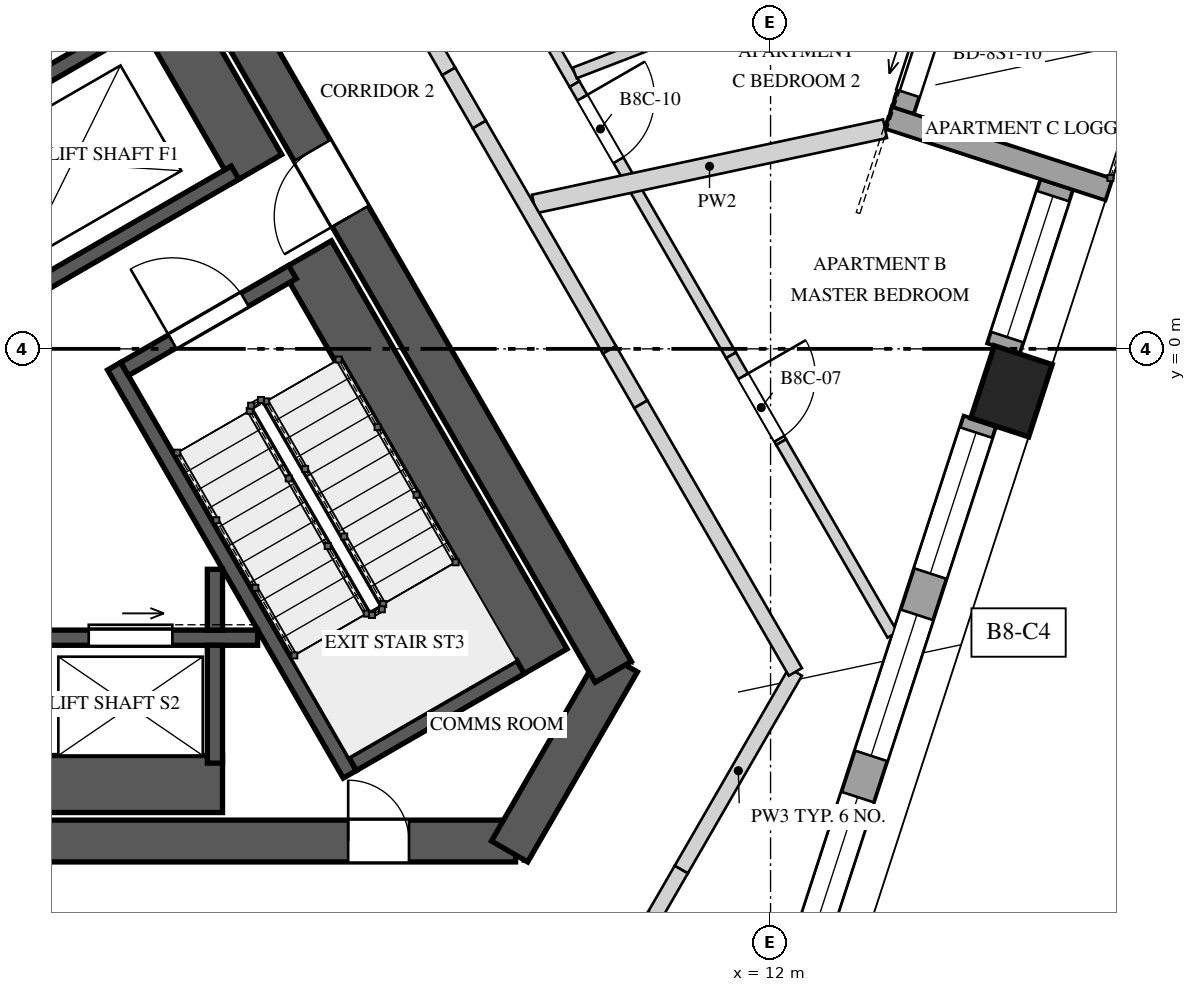
"""IFC4 building model, lengths in metres.
Left out: names, types, materials, properties, quantities, classifications, styles, units other than length and angle.
Written with IfcOpenShell. Run it as: python <this file> out.ifc"""

import sys

from ifc_helpers import new_model, si_unit, direction, frame, frame_2d, origin, origin_2d, place, context, subcontext, project, spatial, polyline, rectangle, outline, extrude, element, fill, save


model = new_model("IFC4")
c1 = context("Model", 3, precision=1e-05, world=origin(), true_north=direction((0.0, 1.0)))
c2 = subcontext(c1, "Body", "Model", "MODEL_VIEW")
j1 = project(units=[si_unit("LENGTHUNIT", "METRE"), si_unit("PLANEANGLEUNIT", "RADIAN")], contexts=[c1])
p1 = place(None, origin())
s1 = spatial("IfcSite", under=j1, at=p1, CompositionType="ELEMENT")
p2 = place(p1, origin())
s2 = spatial("IfcBuilding", under=s1, at=p2, CompositionType="ELEMENT")
p3 = place(p2, frame((0.0, 0.0, 344.4)))
s3 = spatial("IfcBuildingStorey", under=s2, at=p3, CompositionType="ELEMENT", Elevation=344.4)
p4 = place(p3, frame((-8.646, -6.475, 0.0), z_axis=(0.0, 0.0, 1.0), x_axis=(1.0, 0.0, 0.0)))
e1 = element("IfcWall", 1, at=p4, inside=s3, PredefinedType="SHEAR", context=c2, shape_type="SweptSolid", body=[
    extrude(rectangle(XDim=17.292, YDim=0.55, at=frame_2d((8.646, 0.0))), origin(), (0.0, 0.0, 1.0), 4.0),
])
p5 = place(p4, frame((6.851, 0.0, 0.0)))
e2 = element("IfcOpeningElement", 2, at=p5, cuts=e1, PredefinedType="OPENING", context=c2, shape_type="SweptSolid", body=[
    extrude(rectangle(XDim=1.0, YDim=2.4, at=frame_2d((0.5, 1.2))), frame((0.0, 0.285, 0.0), z_axis=(0.0, -1.0, 0.0), x_axis=(1.0, 0.0, 0.0)), (0.0, 0.0, 1.0), 0.57),
])
p6 = place(p4, frame((15.089, 0.0, 0.0)))
e3 = element("IfcOpeningElement", 3, at=p6, cuts=e1, PredefinedType="OPENING", context=c2, shape_type="SweptSolid", body=[
    extrude(rectangle(XDim=0.8, YDim=2.1, at=frame_2d((0.4, 1.05))), frame((0.0, 0.285, 0.0), z_axis=(0.0, -1.0, 0.0), x_axis=(1.0, 0.0, 0.0)), (0.0, 0.0, 1.0), 0.57),
])
p7 = place(p3, frame((8.566, -6.613, 0.0), z_axis=(0.0, 0.0, 1.0), x_axis=(0.499995765644, 0.866027848477, 0.0)))
e4 = element("IfcWall", 4, at=p7, inside=s3, PredefinedType="SHEAR", context=c2, shape_type="SweptSolid", body=[
    extrude(rectangle(XDim=2.887, YDim=0.55, at=frame_2d((1.443, 0.0))), origin(), (0.0, 0.0, 1.0), 4.0),
])
p8 = place(p3, frame((9.93, -4.25, 0.0), z_axis=(0.0, 0.0, 1.0), x_axis=(-0.499994590896, 0.86602852671, 0.0)))
e5 = element("IfcWall", 5, at=p8, inside=s3, PredefinedType="SHEAR", context=c2, shape_type="SweptSolid", body=[
    extrude(rectangle(XDim=17.292, YDim=0.55, at=frame_2d((8.646, 0.0))), origin(), (0.0, 0.0, 1.0), 4.0),
])
p9 = place(p8, frame((6.921, 0.0, 0.0)))
e6 = element("IfcOpeningElement", 6, at=p9, cuts=e5, PredefinedType="OPENING", context=c2, shape_type="SweptSolid", body=[
    extrude(rectangle(XDim=1.0, YDim=2.4, at=frame_2d((0.5, 1.2))), frame((0.0, 0.285, 0.0), z_axis=(0.0, -1.0, 0.0), x_axis=(1.0, 0.0, 0.0)), (0.0, 0.0, 1.0), 0.57),
])
p10 = place(p3, frame((15.17, -0.558, 0.0), z_axis=(0.0, 0.0, 1.0), x_axis=(0.309016994375, 0.951056516295, 0.0)))
e7 = element("IfcColumn", 7, at=p10, inside=s3, PredefinedType="COLUMN", context=c2, shape_type="SweptSolid", body=[
    extrude(rectangle(XDim=1.0, YDim=0.8, at=origin_2d()), origin(), (0.0, 0.0, 1.0), 4.0),
])
p11 = place(p3, frame((12.494, -7.905, 0.0), z_axis=(0.0, 0.0, 1.0), x_axis=(0.309008326872, 0.951059332494, 0.0)))
e8 = element("IfcWall", 8, at=p11, inside=s3, PredefinedType="SOLIDWALL", context=c2, shape_type="SweptSolid", body=[
    extrude(rectangle(XDim=7.314, YDim=0.45, at=frame_2d((3.657, 0.0))), origin(), (0.0, 0.0, 1.0), 3.3),
])
p12 = place(p11, frame((0.161, 0.0, 0.4)))
e9 = element("IfcOpeningElement", 9, at=p12, cuts=e8, PredefinedType="OPENING", context=c2, shape_type="SweptSolid", body=[
    extrude(rectangle(XDim=1.95, YDim=2.75, at=frame_2d((0.975, 1.375))), frame((0.0, 0.235, 0.0), z_axis=(0.0, -1.0, 0.0), x_axis=(1.0, 0.0, 0.0)), (0.0, 0.0, 1.0), 0.47),
])
p13 = place(p11, frame((2.682, 0.0, 0.4)))
e10 = element("IfcOpeningElement", 10, at=p13, cuts=e8, PredefinedType="OPENING", context=c2, shape_type="SweptSolid", body=[
    extrude(rectangle(XDim=1.95, YDim=2.75, at=frame_2d((0.975, 1.375))), frame((0.0, 0.235, 0.0), z_axis=(0.0, -1.0, 0.0), x_axis=(1.0, 0.0, 0.0)), (0.0, 0.0, 1.0), 0.47),
])
p14 = place(p11, frame((5.203, 0.0, 0.4)))
e11 = element("IfcOpeningElement", 11, at=p14, cuts=e8, PredefinedType="OPENING", context=c2, shape_type="SweptSolid", body=[
    extrude(rectangle(XDim=1.95, YDim=2.75, at=frame_2d((0.975, 1.375))), frame((0.0, 0.235, 0.0), z_axis=(0.0, -1.0, 0.0), x_axis=(1.0, 0.0, 0.0)), (0.0, 0.0, 1.0), 0.47),
])
p15 = place(p3, frame((15.063, 0.002, 0.0), z_axis=(0.0, 0.0, 1.0), x_axis=(0.309059334219, 0.951042758204, 0.0)))
e12 = element("IfcWall", 12, at=p15, inside=s3, PredefinedType="SOLIDWALL", context=c2, shape_type="SweptSolid", body=[
    extrude(rectangle(XDim=2.271, YDim=0.45, at=frame_2d((1.135, 0.0))), origin(), (0.0, 0.0, 1.0), 3.3),
])
p16 = place(p15, frame((0.161, 0.0, 0.4)))
e13 = element("IfcOpeningElement", 13, at=p16, cuts=e12, PredefinedType="OPENING", context=c2, shape_type="SweptSolid", body=[
    extrude(rectangle(XDim=1.95, YDim=2.75, at=frame_2d((0.975, 1.375))), frame((0.0, 0.235, 0.0), z_axis=(0.0, -1.0, 0.0), x_axis=(1.0, 0.0, 0.0)), (0.0, 0.0, 1.0), 0.47),
])
p17 = place(p3, frame((13.741, 3.135, 0.0), z_axis=(0.0, 0.0, 1.0), x_axis=(0.308966581759, 0.95107289487, 0.0)))
e14 = element("IfcWall", 14, at=p17, inside=s3, PredefinedType="SOLIDWALL", context=c2, shape_type="SweptSolid", body=[
    extrude(rectangle(XDim=2.171, YDim=0.3, at=frame_2d((1.086, 0.0))), origin(), (0.0, 0.0, 1.0), 3.3),
])
p18 = place(p17, frame((0.236, 0.0, 0.0)))
e15 = element("IfcOpeningElement", 15, at=p18, cuts=e14, PredefinedType="OPENING", context=c2, shape_type="SweptSolid", body=[
    extrude(rectangle(XDim=1.7, YDim=2.5, at=frame_2d((0.85, 1.25))), frame((0.0, 0.16, 0.0), z_axis=(0.0, -1.0, 0.0), x_axis=(1.0, 0.0, 0.0)), (0.0, 0.0, 1.0), 0.32),
])
p19 = place(p3, frame((16.453, 2.096, 0.0), z_axis=(0.0, 0.0, 1.0), x_axis=(-0.951041715693, 0.309062542235, 0.0)))
e16 = element("IfcWall", 16, at=p19, inside=s3, PredefinedType="SOLIDWALL", context=c2, shape_type="SweptSolid", body=[
    extrude(rectangle(XDim=3.05, YDim=0.3, at=frame_2d((1.525, 0.0))), origin(), (0.0, 0.0, 1.0), 3.3),
])
p20 = place(p3, frame((8.998, -4.135, 0.0), z_axis=(0.0, 0.0, 1.0), x_axis=(-0.500009909098, 0.866019682689, 0.0)))
e17 = element("IfcWall", 17, at=p20, inside=s3, PredefinedType="SOLIDWALL", context=c2, shape_type="SweptSolid", body=[
    extrude(rectangle(XDim=6.2, YDim=0.75, at=frame_2d((3.1, 0.0))), origin(), (0.0, 0.0, 1.0), 3.65),
])
p21 = place(p3, frame((6.465, -5.597, 0.0), z_axis=(0.0, 0.0, 1.0), x_axis=(-0.49998037582, 0.866036733513, 0.0)))
e18 = element("IfcWall", 18, at=p21, inside=s3, PredefinedType="SOLIDWALL", context=c2, shape_type="SweptSolid", body=[
    extrude(rectangle(XDim=6.2, YDim=0.2, at=frame_2d((3.1, 0.0))), origin(), (0.0, 0.0, 1.0), 3.65),
])
p22 = place(p3, frame((6.501, -5.461, 0.0), z_axis=(0.0, 0.0, 1.0), x_axis=(0.865989465428, 0.500062241894, 0.0)))
e19 = element("IfcWall", 19, at=p22, inside=s3, PredefinedType="SOLIDWALL", context=c2, shape_type="SweptSolid", body=[
    extrude(rectangle(XDim=2.55, YDim=0.2, at=frame_2d((1.275, 0.0))), origin(), (0.0, 0.0, 1.0), 3.65),
])
p23 = place(p3, frame((3.501, -0.265, 0.0), z_axis=(0.0, 0.0, 1.0), x_axis=(0.866030925526, 0.499990435942, 0.0)))
e20 = element("IfcWall", 20, at=p23, inside=s3, PredefinedType="SOLIDWALL", context=c2, shape_type="SweptSolid", body=[
    extrude(rectangle(XDim=2.55, YDim=0.2, at=frame_2d((1.275, 0.0))), origin(), (0.0, 0.0, 1.0), 3.65),
])
p24 = place(p23, frame((0.725, 0.0, 0.0)))
e21 = element("IfcOpeningElement", 21, at=p24, cuts=e20, PredefinedType="OPENING", context=c2, shape_type="SweptSolid", body=[
    extrude(rectangle(XDim=1.1, YDim=2.4, at=frame_2d((0.55, 1.2))), frame((0.0, 0.11, 0.0), z_axis=(0.0, -1.0, 0.0), x_axis=(1.0, 0.0, 0.0)), (0.0, 0.0, 1.0), 0.22),
])
p25 = place(p3, frame((-0.71, -3.8, 0.0), z_axis=(0.0, 0.0, 1.0), x_axis=(1.0, 0.0, 0.0)))
e22 = element("IfcWall", 22, at=p25, inside=s3, PredefinedType="SOLIDWALL", context=c2, shape_type="SweptSolid", body=[
    extrude(rectangle(XDim=5.961, YDim=0.2, at=frame_2d((2.981, 0.0))), origin(), (0.0, 0.0, 1.0), 3.65),
])
p26 = place(p25, frame((1.09, 0.0, 0.0)))
e23 = element("IfcOpeningElement", 23, at=p26, cuts=e22, PredefinedType="OPENING", context=c2, shape_type="SweptSolid", body=[
    extrude(rectangle(XDim=1.1, YDim=2.1, at=frame_2d((0.55, 1.05))), frame((0.0, 0.11, 0.0), z_axis=(0.0, -1.0, 0.0), x_axis=(1.0, 0.0, 0.0)), (0.0, 0.0, 1.0), 0.22),
])
p27 = place(p25, frame((3.74, 0.0, 0.0)))
e24 = element("IfcOpeningElement", 24, at=p27, cuts=e22, PredefinedType="OPENING", context=c2, shape_type="SweptSolid", body=[
    extrude(rectangle(XDim=1.1, YDim=2.1, at=frame_2d((0.55, 1.05))), frame((0.0, 0.11, 0.0), z_axis=(0.0, -1.0, 0.0), x_axis=(1.0, 0.0, 0.0)), (0.0, 0.0, 1.0), 0.22),
])
p28 = place(p3, frame((-0.71, -5.725, 0.0), z_axis=(0.0, 0.0, 1.0), x_axis=(1.0, 0.0, 0.0)))
e25 = element("IfcWall", 25, at=p28, inside=s3, PredefinedType="SOLIDWALL", context=c2, shape_type="SweptSolid", body=[
    extrude(rectangle(XDim=5.5, YDim=0.75, at=frame_2d((2.75, 0.0))), origin(), (0.0, 0.0, 1.0), 3.65),
])
p29 = place(p3, frame((4.69, -3.9, 0.0), z_axis=(0.0, 0.0, 1.0), x_axis=(0.0, -1.0, 0.0)))
e26 = element("IfcWall", 26, at=p29, inside=s3, PredefinedType="SOLIDWALL", context=c2, shape_type="SweptSolid", body=[
    extrude(rectangle(XDim=1.55, YDim=0.2, at=frame_2d((0.775, 0.0))), origin(), (0.0, 0.0, 1.0), 3.65),
])
p30 = place(p3, frame((4.69, -2.9, 0.0), z_axis=(0.0, 0.0, 1.0), x_axis=(0.0, -1.0, 0.0)))
e27 = element("IfcWall", 27, at=p30, inside=s3, PredefinedType="SOLIDWALL", context=c2, shape_type="SweptSolid", body=[
    extrude(rectangle(XDim=0.8, YDim=0.2, at=frame_2d((0.4, 0.0))), origin(), (0.0, 0.0, 1.0), 3.65),
])
p31 = place(p3, frame((5.243, 2.369, 0.0), z_axis=(0.0, 0.0, 1.0), x_axis=(-0.500002801628, 0.866023786258, 0.0)))
e28 = element("IfcWall", 28, at=p31, inside=s3, PredefinedType="SOLIDWALL", context=c2, shape_type="SweptSolid", body=[
    extrude(rectangle(XDim=4.9, YDim=0.75, at=frame_2d((2.45, 0.0))), origin(), (0.0, 0.0, 1.0), 3.65),
])
for number, where, z_axis, x_axis in (
    (29, (2.227, 0.743, 0.0), (0.0, 0.0, 1.0), (0.866, 0.5, 0.0)),
    (30, (1.052, 2.778, 0.0), (0.0, 0.0, 1.0), (0.866, 0.5, 0.0)),
):
    element("IfcWall", number, at=place(p3, frame(where, z_axis=z_axis, x_axis=x_axis)), inside=s3, PredefinedType="SOLIDWALL", context=c2, shape_type="SweptSolid", body=[
        extrude(rectangle(XDim=3.15, YDim=0.2, at=frame_2d((1.575, 0.0))), origin(), (0.0, 0.0, 1.0), 3.65),
    ])
p32 = place(p3, frame((9.03, 4.16, 0.0), z_axis=(0.0, 0.0, 1.0), x_axis=(0.499767520639, -0.866159584207, 0.0)))
e31 = element("IfcWall", 31, at=p32, inside=s3, PredefinedType="PARTITIONING", context=c2, shape_type="SweptSolid", body=[
    extrude(rectangle(XDim=0.781, YDim=0.15, at=frame_2d((0.391, 0.0))), origin(), (0.0, 0.0, 1.0), 2.75),
])
p33 = place(p3, frame((9.42, 3.483, 0.0), z_axis=(0.0, 0.0, 1.0), x_axis=(0.50002680699, -0.866009926209, 0.0)))
e32 = element("IfcWall", 32, at=p33, inside=s3, PredefinedType="PARTITIONING", context=c2, shape_type="SweptSolid", body=[
    extrude(rectangle(XDim=4.12, YDim=0.15, at=frame_2d((2.06, 0.0))), origin(), (0.0, 0.0, 1.0), 3.65),
])
p34 = place(p33, frame((0.207, 0.0, 0.0)))
e33 = element("IfcOpeningElement", 33, at=p34, cuts=e32, PredefinedType="OPENING", context=c2, shape_type="SweptSolid", body=[
    extrude(rectangle(XDim=0.95, YDim=2.4, at=frame_2d((0.475, 1.2))), frame((0.0, 0.085, 0.0), z_axis=(0.0, -1.0, 0.0), x_axis=(1.0, 0.0, 0.0)), (0.0, 0.0, 1.0), 0.17),
])
p35 = place(p3, frame((11.48, -0.085, 0.0), z_axis=(0.0, 0.0, 1.0), x_axis=(0.499941428866, -0.866059217203, 0.0)))
e34 = element("IfcWall", 34, at=p35, inside=s3, PredefinedType="PARTITIONING", context=c2, shape_type="SweptSolid", body=[
    extrude(outline(polyline([(0.0, 0.0), (1.319, 0.0), (1.319, 3.65), (0.797, 3.65), (0.797, 2.95), (0.0, 2.95), (0.0, 0.0)])), frame((0.0, 0.075, 0.0), z_axis=(0.0, -1.0, 0.0), x_axis=(1.0, 0.0, 0.0)), (0.0, 0.0, 1.0), 0.15),
])
p36 = place(p35, frame((0.319, 0.0, 0.0)))
e35 = element("IfcOpeningElement", 35, at=p36, cuts=e34, PredefinedType="OPENING", context=c2, shape_type="SweptSolid", body=[
    extrude(rectangle(XDim=0.95, YDim=2.4, at=frame_2d((0.475, 1.2))), frame((0.0, 0.085, 0.0), z_axis=(0.0, -1.0, 0.0), x_axis=(1.0, 0.0, 0.0)), (0.0, 0.0, 1.0), 0.17),
])
p37 = place(p3, frame((12.14, -1.227, 0.0), z_axis=(0.0, 0.0, 1.0), x_axis=(0.500032963244, -0.86600637161, 0.0)))
e36 = element("IfcWall", 36, at=p37, inside=s3, PredefinedType="PARTITIONING", context=c2, shape_type="SweptSolid", body=[
    extrude(rectangle(XDim=2.927, YDim=0.15, at=frame_2d((1.463, 0.0))), origin(), (0.0, 0.0, 1.0), 3.65),
])
p38 = place(p3, frame((8.888, 1.906, 0.0), z_axis=(0.0, 0.0, 1.0), x_axis=(0.977775173816, 0.209656169645, 0.0)))
e37 = element("IfcWall", 37, at=p38, inside=s3, PredefinedType="SOLIDWALL", context=c2, shape_type="SweptSolid", body=[
    extrude(rectangle(XDim=4.723, YDim=0.25, at=frame_2d((2.362, 0.0))), origin(), (0.0, 0.0, 1.0), 3.65),
])
p39 = place(p3, frame((12.8, 4.93, 0.0), z_axis=(0.0, 0.0, 1.0), x_axis=(-0.933173371739, -0.359426568685, 0.0)))
e38 = element("IfcWall", 38, at=p39, inside=s3, PredefinedType="PARTITIONING", context=c2, shape_type="SweptSolid", body=[
    extrude(rectangle(XDim=3.619, YDim=0.15, at=frame_2d((1.81, 0.0))), origin(), (0.0, 0.0, 1.0), 2.75),
])
p40 = place(p3, frame((12.326, -4.25, 0.0), z_axis=(0.0, 0.0, 1.0), x_axis=(-0.500003959331, -0.866023117852, 0.0)))
e39 = element("IfcWall", 39, at=p40, inside=s3, PredefinedType="SOLIDWALL", context=c2, shape_type="SweptSolid", body=[
    extrude(rectangle(XDim=3.003, YDim=0.2, at=frame_2d((1.501, 0.0))), origin(), (0.0, 0.0, 1.0), 3.65),
])
p41 = place(p3, frame((10.825, -6.851, 0.0), z_axis=(0.0, 0.0, 1.0), x_axis=(-0.500144223137, -0.865942120504, 0.0)))
e40 = element("IfcWall", 40, at=p41, inside=s3, PredefinedType="SOLIDWALL", context=c2, shape_type="SweptSolid", body=[
    extrude(rectangle(XDim=0.701, YDim=0.2, at=frame_2d((0.351, 0.0))), origin(), (0.0, 0.0, 1.0), 2.95),
])
p42 = place(p3, frame((10.474, -7.458, 0.0), z_axis=(0.0, 0.0, 1.0), x_axis=(-0.499929168788, -0.866066294342, 0.0)))
e41 = element("IfcWall", 41, at=p42, inside=s3, PredefinedType="SOLIDWALL", context=c2, shape_type="SweptSolid", body=[
    extrude(rectangle(XDim=1.261, YDim=0.2, at=frame_2d((0.63, 0.0))), origin(), (0.0, 0.0, 1.0), 3.65),
])
p43 = place(p3, frame((7.146, 4.722, 0.0), z_axis=(0.0, 0.0, 1.0), x_axis=(0.499955681623, -0.866050989499, 0.0)))
e42 = element("IfcWall", 42, at=p43, inside=s3, PredefinedType="SOLIDWALL", context=c2, shape_type="SweptSolid", body=[
    extrude(rectangle(XDim=1.238, YDim=0.2, at=frame_2d((0.619, 0.0))), origin(), (0.0, 0.0, 1.0), 3.65),
])
p44 = place(p3, frame((7.765, 3.65, 0.0), z_axis=(0.0, 0.0, 1.0), x_axis=(0.500141487433, -0.865943700565, 0.0)))
e43 = element("IfcWall", 43, at=p44, inside=s3, PredefinedType="SOLIDWALL", context=c2, shape_type="SweptSolid", body=[
    extrude(rectangle(XDim=0.807, YDim=0.2, at=frame_2d((0.403, 0.0))), origin(), (0.0, 0.0, 1.0), 2.75),
])
p45 = place(p3, frame((8.169, 2.951, 0.0), z_axis=(0.0, 0.0, 1.0), x_axis=(0.499959115548, -0.866049007147, 0.0)))
e44 = element("IfcWall", 44, at=p45, inside=s3, PredefinedType="SOLIDWALL", context=c2, shape_type="SweptSolid", body=[
    extrude(rectangle(XDim=3.423, YDim=0.2, at=frame_2d((1.711, 0.0))), origin(), (0.0, 0.0, 1.0), 3.65),
])
p46 = place(p3, frame((9.88, -0.013, 0.0), z_axis=(0.0, 0.0, 1.0), x_axis=(0.499952654668, -0.866052736899, 0.0)))
e45 = element("IfcWall", 45, at=p46, inside=s3, PredefinedType="SOLIDWALL", context=c2, shape_type="SweptSolid", body=[
    extrude(rectangle(XDim=0.826, YDim=0.2, at=frame_2d((0.413, 0.0))), origin(), (0.0, 0.0, 1.0), 2.95),
])
p47 = place(p3, frame((10.293, -0.729, 0.0), z_axis=(0.0, 0.0, 1.0), x_axis=(0.50002046505, -0.86601358796, 0.0)))
e46 = element("IfcWall", 46, at=p47, inside=s3, PredefinedType="SOLIDWALL", context=c2, shape_type="SweptSolid", body=[
    extrude(rectangle(XDim=4.066, YDim=0.2, at=frame_2d((2.033, 0.0))), origin(), (0.0, 0.0, 1.0), 3.65),
])
p48 = place(p12, origin())
e47 = element("IfcWindow", 47, at=p48, inside=s3, PartitioningType="SINGLE_PANEL", PredefinedType="WINDOW", context=c2, shape_type="SweptSolid", body=[
    extrude(rectangle(XDim=1.95, YDim=2.75, at=frame_2d((0.975, 1.375))), frame((0.0, 0.03, 0.0), z_axis=(0.0, -1.0, 0.0), x_axis=(1.0, 0.0, 0.0)), (0.0, 0.0, 1.0), 0.06),
])
fill(e9, e47)
p49 = place(p13, origin())
e48 = element("IfcWindow", 48, at=p49, inside=s3, PartitioningType="SINGLE_PANEL", PredefinedType="WINDOW", context=c2, shape_type="SweptSolid", body=[
    extrude(rectangle(XDim=1.95, YDim=2.75, at=frame_2d((0.975, 1.375))), frame((0.0, 0.03, 0.0), z_axis=(0.0, -1.0, 0.0), x_axis=(1.0, 0.0, 0.0)), (0.0, 0.0, 1.0), 0.06),
])
fill(e10, e48)
p50 = place(p14, origin())
e49 = element("IfcWindow", 49, at=p50, inside=s3, PartitioningType="SINGLE_PANEL", PredefinedType="WINDOW", context=c2, shape_type="SweptSolid", body=[
    extrude(rectangle(XDim=1.95, YDim=2.75, at=frame_2d((0.975, 1.375))), frame((0.0, 0.03, 0.0), z_axis=(0.0, -1.0, 0.0), x_axis=(1.0, 0.0, 0.0)), (0.0, 0.0, 1.0), 0.06),
])
fill(e11, e49)
p51 = place(p16, origin())
e50 = element("IfcWindow", 50, at=p51, inside=s3, PartitioningType="SINGLE_PANEL", PredefinedType="WINDOW", context=c2, shape_type="SweptSolid", body=[
    extrude(rectangle(XDim=1.95, YDim=2.75, at=frame_2d((0.975, 1.375))), frame((0.0, 0.03, 0.0), z_axis=(0.0, -1.0, 0.0), x_axis=(1.0, 0.0, 0.0)), (0.0, 0.0, 1.0), 0.06),
])
fill(e13, e50)
p52 = place(p18, origin())
e51 = element("IfcDoor", 51, at=p52, inside=s3, OperationType="SLIDING_TO_LEFT", PredefinedType="DOOR", context=c2, shape_type="SweptSolid", body=[
    extrude(rectangle(XDim=1.7, YDim=2.5, at=frame_2d((0.85, 1.25))), frame((0.0, 0.025, 0.0), z_axis=(0.0, -1.0, 0.0), x_axis=(1.0, 0.0, 0.0)), (0.0, 0.0, 1.0), 0.05),
])
fill(e15, e51)
p53 = place(p24, origin())
e52 = element("IfcDoor", 52, at=p53, inside=s3, OperationType="SINGLE_SWING_RIGHT", PredefinedType="DOOR", context=c2, shape_type="SweptSolid", body=[
    extrude(rectangle(XDim=1.1, YDim=2.4, at=frame_2d((0.55, 1.2))), frame((0.0, 0.025, 0.0), z_axis=(0.0, -1.0, 0.0), x_axis=(1.0, 0.0, 0.0)), (0.0, 0.0, 1.0), 0.05),
])
fill(e21, e52)
p54 = place(p27, origin())
e53 = element("IfcDoor", 53, at=p54, inside=s3, OperationType="SLIDING_TO_RIGHT", PredefinedType="DOOR", context=c2, shape_type="SweptSolid", body=[
    extrude(rectangle(XDim=1.1, YDim=2.1, at=frame_2d((0.55, 1.05))), frame((0.0, 0.025, 0.0), z_axis=(0.0, -1.0, 0.0), x_axis=(1.0, 0.0, 0.0)), (0.0, 0.0, 1.0), 0.05),
])
fill(e24, e53)
p55 = place(p9, origin())
e54 = element("IfcDoor", 54, at=p55, inside=s3, OperationType="SINGLE_SWING_RIGHT", PredefinedType="DOOR", context=c2, shape_type="SweptSolid", body=[
    extrude(rectangle(XDim=1.0, YDim=2.4, at=frame_2d((0.5, 1.2))), frame((0.0, 0.025, 0.0), z_axis=(0.0, -1.0, 0.0), x_axis=(1.0, 0.0, 0.0)), (0.0, 0.0, 1.0), 0.05),
])
fill(e6, e54)
p56 = place(p6, origin())
e55 = element("IfcDoor", 55, at=p56, inside=s3, OperationType="SINGLE_SWING_RIGHT", PredefinedType="DOOR", context=c2, shape_type="SweptSolid", body=[
    extrude(rectangle(XDim=0.8, YDim=2.1, at=frame_2d((0.4, 1.05))), frame((0.0, 0.025, 0.0), z_axis=(0.0, -1.0, 0.0), x_axis=(1.0, 0.0, 0.0)), (0.0, 0.0, 1.0), 0.05),
])
fill(e3, e55)
p57 = place(p36, origin())
e56 = element("IfcDoor", 56, at=p57, inside=s3, OperationType="SINGLE_SWING_LEFT", PredefinedType="DOOR", context=c2, shape_type="SweptSolid", body=[
    extrude(rectangle(XDim=0.95, YDim=2.4, at=frame_2d((0.475, 1.2))), frame((0.0, 0.025, 0.0), z_axis=(0.0, -1.0, 0.0), x_axis=(1.0, 0.0, 0.0)), (0.0, 0.0, 1.0), 0.05),
])
fill(e35, e56)
p58 = place(p34, origin())
e57 = element("IfcDoor", 57, at=p58, inside=s3, OperationType="SINGLE_SWING_RIGHT", PredefinedType="DOOR", context=c2, shape_type="SweptSolid", body=[
    extrude(rectangle(XDim=0.95, YDim=2.4, at=frame_2d((0.475, 1.2))), frame((0.0, 0.025, 0.0), z_axis=(0.0, -1.0, 0.0), x_axis=(1.0, 0.0, 0.0)), (0.0, 0.0, 1.0), 0.05),
])
fill(e33, e57)
save(model, sys.argv[1])
